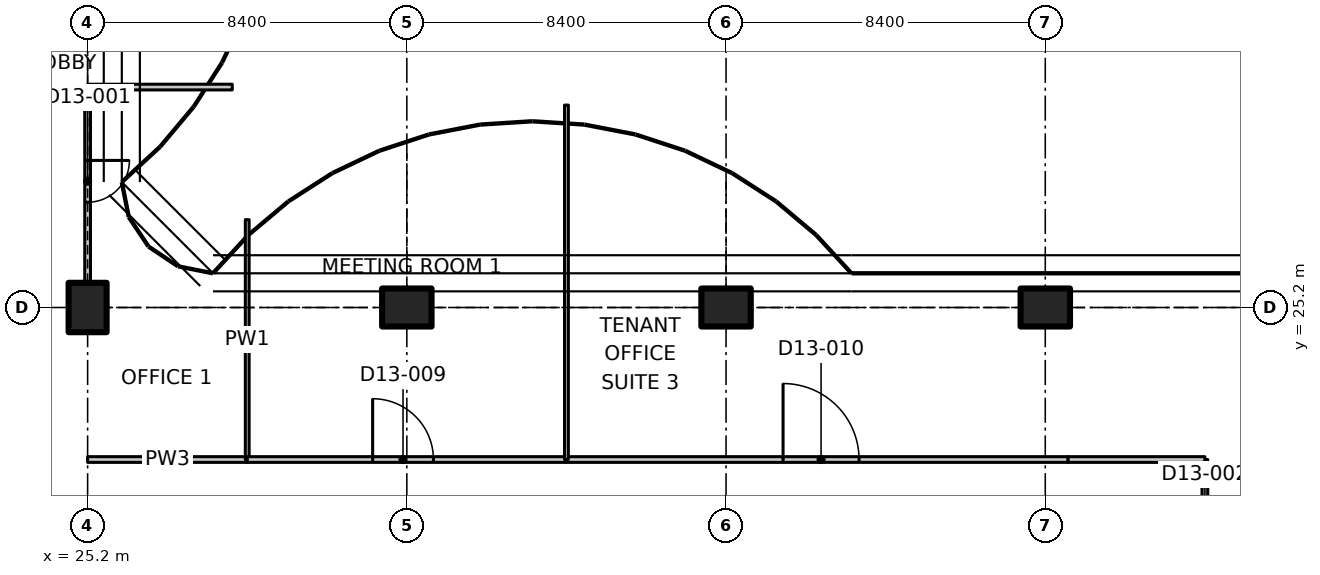
"""IFC4 building model, lengths in metres.
Left out: names, types, materials, properties, quantities, classifications, styles, units other than length and angle.
Written with IfcOpenShell. Run it as: python <this file> out.ifc"""

import sys

from ifc_helpers import new_model, si_unit, direction, frame, frame_2d, origin, origin_2d, place, context, subcontext, project, spatial, polyline, rectangle, outline, extrude, element, fill, save


model = new_model("IFC4")
c1 = context("Model", 3, precision=1e-05, world=origin(), true_north=direction((0.0, 1.0)))
c2 = subcontext(c1, "Body", "Model", "MODEL_VIEW")
j1 = project(units=[si_unit("LENGTHUNIT", "METRE"), si_unit("PLANEANGLEUNIT", "RADIAN")], contexts=[c1])
p1 = place(None, origin())
s1 = spatial("IfcSite", under=j1, at=p1, CompositionType="ELEMENT")
p2 = place(p1, origin())
s2 = spatial("IfcBuilding", under=s1, at=p2, CompositionType="ELEMENT")
p3 = place(p2, frame((0.0, 0.0, 91.7)))
s3 = spatial("IfcBuildingStorey", under=s2, at=p3, CompositionType="ELEMENT", Elevation=91.7)
for number, where, z_axis, x_axis in (
    (1, (25.2, 25.2, 0.0), (0.0, 0.0, 1.0), (1.0, 0.0, 0.0)),
    (2, (33.6, 25.2, 0.0), (0.0, 0.0, 1.0), (0.0, 1.0, 0.0)),
    (3, (42.0, 25.2, 0.0), (0.0, 0.0, 1.0), (0.0, 1.0, 0.0)),
    (4, (50.4, 25.2, 0.0), (0.0, 0.0, 1.0), (0.0, 1.0, 0.0)),
):
    element("IfcColumn", number, at=place(p3, frame(where, z_axis=z_axis, x_axis=x_axis)), inside=s3, PredefinedType="COLUMN", context=c2, shape_type="SweptSolid", body=[
        extrude(rectangle(XDim=1.0, YDim=1.3, at=origin_2d()), origin(), (0.0, 0.0, 1.0), 3.35),
    ])
p4 = place(p3, frame((25.2, 21.2, 0.0), z_axis=(0.0, 0.0, 1.0), x_axis=(1.0, 0.0, 0.0)))
e5 = element("IfcWall", 5, at=p4, inside=s3, PredefinedType="PARTITIONING", context=c2, shape_type="SweptSolid", body=[
    extrude(rectangle(XDim=4.2, YDim=0.15, at=frame_2d((2.1, 0.0))), origin(), (0.0, 0.0, 1.0), 3.33),
])
p5 = place(p3, frame((29.4, 27.511, 0.0), z_axis=(0.0, 0.0, 1.0), x_axis=(0.0, -1.0, 0.0)))
e6 = element("IfcWall", 6, at=p5, inside=s3, PredefinedType="PARTITIONING", context=c2, shape_type="SweptSolid", body=[
    extrude(outline(polyline([(0.0, 0.0), (6.311, 0.0), (6.311, 3.33), (2.761, 3.33), (2.759, 2.98), (1.863, 2.98), (1.861, 3.33), (0.236, 3.33), (0.0, 3.33), (0.0, 0.0)])), frame((0.0, 0.05, 0.0), z_axis=(0.0, -1.0, 0.0), x_axis=(1.0, 0.0, 0.0)), (0.0, 0.0, 1.0), 0.1),
])
p6 = place(p3, frame((25.2, 31.0, 0.0), z_axis=(0.0, 0.0, 1.0), x_axis=(0.0, -1.0, 0.0)))
e7 = element("IfcWall", 7, at=p6, inside=s3, PredefinedType="PARTITIONING", context=c2, shape_type="SweptSolid", body=[
    extrude(outline(polyline([(0.0, 0.0), (5.13, 0.0), (5.13, 2.98), (0.0, 2.98), (0.0, 0.0)])), frame((0.0, 0.075, 0.0), z_axis=(0.0, -1.0, 0.0), x_axis=(1.0, 0.0, 0.0)), (0.0, 0.0, 1.0), 0.15),
])
p7 = place(p6, frame((1.93, 0.0, 0.0)))
e8 = element("IfcOpeningElement", 8, at=p7, cuts=e7, PredefinedType="OPENING", context=c2, shape_type="SweptSolid", body=[
    extrude(rectangle(XDim=1.1, YDim=2.1, at=frame_2d((0.55, 1.05))), frame((0.0, 0.085, 0.0), z_axis=(0.0, -1.0, 0.0), x_axis=(1.0, 0.0, 0.0)), (0.0, 0.0, 1.0), 0.17),
])
p8 = place(p3, frame((25.2, 31.0, 0.0), z_axis=(0.0, 0.0, 1.0), x_axis=(1.0, 0.0, 0.0)))
e9 = element("IfcWall", 9, at=p8, inside=s3, PredefinedType="PARTITIONING", context=c2, shape_type="SweptSolid", body=[
    extrude(rectangle(XDim=3.806, YDim=0.15, at=frame_2d((1.903, 0.0))), origin(), (0.0, 0.0, 1.0), 2.98),
])
p9 = place(p3, frame((54.6, 21.2, 0.0), z_axis=(0.0, 0.0, 1.0), x_axis=(0.0, -1.0, 0.0)))
e10 = element("IfcWall", 10, at=p9, inside=s3, PredefinedType="PARTITIONING", context=c2, shape_type="SweptSolid", body=[
    extrude(rectangle(XDim=8.2, YDim=0.15, at=frame_2d((4.1, 0.0))), origin(), (0.0, 0.0, 1.0), 3.33),
])
p10 = place(p9, frame((3.2, 0.0, 0.0)))
e11 = element("IfcOpeningElement", 11, at=p10, cuts=e10, PredefinedType="OPENING", context=c2, shape_type="SweptSolid", body=[
    extrude(rectangle(XDim=2.0, YDim=2.4, at=frame_2d((1.0, 1.2))), frame((0.0, 0.085, 0.0), z_axis=(0.0, -1.0, 0.0), x_axis=(1.0, 0.0, 0.0)), (0.0, 0.0, 1.0), 0.17),
])
p11 = place(p3, frame((29.4, 21.2, 0.0), z_axis=(0.0, 0.0, 1.0), x_axis=(1.0, 0.0, 0.0)))
e12 = element("IfcWall", 12, at=p11, inside=s3, PredefinedType="PARTITIONING", context=c2, shape_type="SweptSolid", body=[
    extrude(rectangle(XDim=8.4, YDim=0.15, at=frame_2d((4.2, 0.0))), origin(), (0.0, 0.0, 1.0), 3.33),
])
p12 = place(p11, frame((3.3, 0.0, 0.0)))
e13 = element("IfcOpeningElement", 13, at=p12, cuts=e12, PredefinedType="OPENING", context=c2, shape_type="SweptSolid", body=[
    extrude(rectangle(XDim=1.6, YDim=2.1, at=frame_2d((0.8, 1.05))), frame((0.0, 0.085, 0.0), z_axis=(0.0, -1.0, 0.0), x_axis=(1.0, 0.0, 0.0)), (0.0, 0.0, 1.0), 0.17),
])
p13 = place(p3, frame((37.8, 21.2, 0.0), z_axis=(0.0, 0.0, 1.0), x_axis=(1.0, 0.0, 0.0)))
e14 = element("IfcWall", 14, at=p13, inside=s3, PredefinedType="PARTITIONING", context=c2, shape_type="SweptSolid", body=[
    extrude(rectangle(XDim=13.2, YDim=0.15, at=frame_2d((6.6, 0.0))), origin(), (0.0, 0.0, 1.0), 3.33),
])
p14 = place(p13, frame((5.7, 0.0, 0.0)))
e15 = element("IfcOpeningElement", 15, at=p14, cuts=e14, PredefinedType="OPENING", context=c2, shape_type="SweptSolid", body=[
    extrude(rectangle(XDim=2.0, YDim=2.4, at=frame_2d((1.0, 1.2))), frame((0.0, 0.085, 0.0), z_axis=(0.0, -1.0, 0.0), x_axis=(1.0, 0.0, 0.0)), (0.0, 0.0, 1.0), 0.17),
])
p15 = place(p3, frame((51.0, 21.2, 0.0), z_axis=(0.0, 0.0, 1.0), x_axis=(1.0, 0.0, 0.0)))
e16 = element("IfcWall", 16, at=p15, inside=s3, PredefinedType="PARTITIONING", context=c2, shape_type="SweptSolid", body=[
    extrude(rectangle(XDim=3.6, YDim=0.15, at=frame_2d((1.8, 0.0))), origin(), (0.0, 0.0, 1.0), 3.33),
])
p16 = place(p3, frame((37.8, 30.526, 0.0), z_axis=(0.0, 0.0, 1.0), x_axis=(0.0, -1.0, 0.0)))
e17 = element("IfcWall", 17, at=p16, inside=s3, PredefinedType="PARTITIONING", context=c2, shape_type="SweptSolid", body=[
    extrude(outline(polyline([(0.0, 0.0), (9.326, 0.0), (9.326, 3.33), (5.776, 3.33), (5.774, 2.98), (4.878, 2.98), (4.876, 3.33), (0.283, 3.33), (0.0, 3.33), (0.0, 0.0)])), frame((0.0, 0.05, 0.0), z_axis=(0.0, -1.0, 0.0), x_axis=(1.0, 0.0, 0.0)), (0.0, 0.0, 1.0), 0.1),
])
p17 = place(p7, origin())
e18 = element("IfcDoor", 18, at=p17, inside=s3, OperationType="SINGLE_SWING_RIGHT", PredefinedType="DOOR", context=c2, shape_type="SweptSolid", body=[
    extrude(rectangle(XDim=1.1, YDim=2.1, at=frame_2d((0.55, 1.05))), frame((0.0, 0.025, 0.0), z_axis=(0.0, -1.0, 0.0), x_axis=(1.0, 0.0, 0.0)), (0.0, 0.0, 1.0), 0.05),
])
fill(e8, e18)
p18 = place(p12, origin())
e19 = element("IfcDoor", 19, at=p18, inside=s3, OperationType="DOUBLE_DOOR_SINGLE_SWING", PredefinedType="DOOR", context=c2, shape_type="SweptSolid", body=[
    extrude(rectangle(XDim=1.6, YDim=2.1, at=frame_2d((0.8, 1.05))), frame((0.0, 0.025, 0.0), z_axis=(0.0, -1.0, 0.0), x_axis=(1.0, 0.0, 0.0)), (0.0, 0.0, 1.0), 0.05),
])
fill(e13, e19)
p19 = place(p14, origin())
e20 = element("IfcDoor", 20, at=p19, inside=s3, OperationType="DOUBLE_DOOR_SINGLE_SWING", PredefinedType="DOOR", context=c2, shape_type="SweptSolid", body=[
    extrude(rectangle(XDim=2.0, YDim=2.4, at=frame_2d((1.0, 1.2))), frame((0.0, 0.025, 0.0), z_axis=(0.0, -1.0, 0.0), x_axis=(1.0, 0.0, 0.0)), (0.0, 0.0, 1.0), 0.05),
])
fill(e15, e20)
save(model, sys.argv[1])
